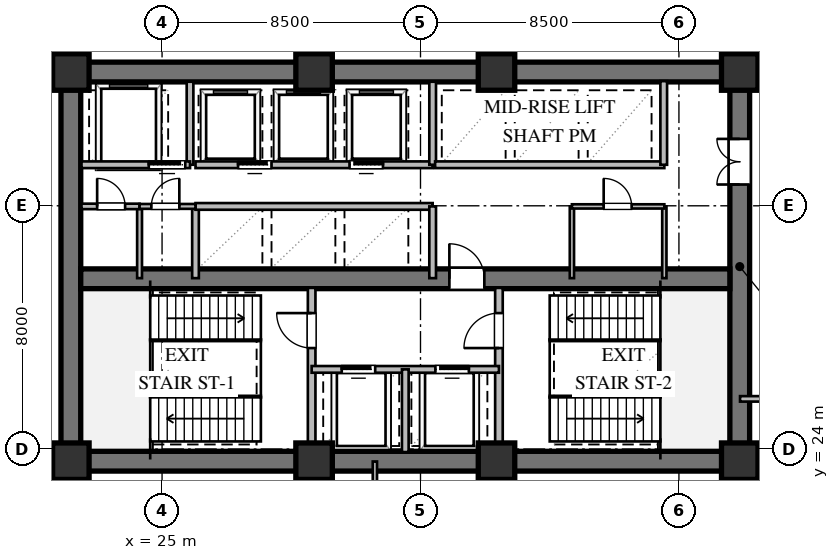
"""IFC4 building model, lengths in metres.
Left out: names, types, materials, properties, quantities, classifications, styles, units other than length and angle.
Written with IfcOpenShell. Run it as: python <this file> out.ifc"""

import sys

from ifc_helpers import new_model, si_unit, direction, frame, frame_2d, origin, origin_2d, place, context, subcontext, project, spatial, rectangle, extrude, element, fill, save


model = new_model("IFC4")
c1 = context("Model", 3, precision=1e-05, world=origin(), true_north=direction((0.0, 1.0)))
c2 = subcontext(c1, "Body", "Model", "MODEL_VIEW")
j1 = project(units=[si_unit("LENGTHUNIT", "METRE"), si_unit("PLANEANGLEUNIT", "RADIAN")], contexts=[c1])
p1 = place(None, origin())
s1 = spatial("IfcSite", under=j1, at=p1, CompositionType="ELEMENT")
p2 = place(p1, origin())
s2 = spatial("IfcBuilding", under=s1, at=p2, CompositionType="ELEMENT")
p3 = place(p2, frame((0.0, 0.0, 14.4)))
s3 = spatial("IfcBuildingStorey", under=s2, at=p3, CompositionType="ELEMENT", Elevation=14.4)
for number, where, z_axis, x_axis in (
    (1, (21.675, 23.6, 0.0), (0.0, 0.0, 1.0), (1.0, 0.0, 0.0)),
    (2, (21.675, 36.4, 0.0), (0.0, 0.0, 1.0), (1.0, 0.0, 0.0)),
):
    element("IfcWall", number, at=place(p3, frame(where, z_axis=z_axis, x_axis=x_axis)), inside=s3, PredefinedType="SHEAR", context=c2, shape_type="SweptSolid", body=[
        extrude(rectangle(XDim=22.65, YDim=0.65, at=frame_2d((11.325, 0.0))), origin(), (0.0, 0.0, 1.0), 4.52),
    ])
p4 = place(p3, frame((22.0, 23.925, 0.0), z_axis=(0.0, 0.0, 1.0), x_axis=(0.0, 1.0, 0.0)))
e3 = element("IfcWall", 3, at=p4, inside=s3, PredefinedType="SHEAR", context=c2, shape_type="SweptSolid", body=[
    extrude(rectangle(XDim=12.15, YDim=0.65, at=frame_2d((6.075, 0.0))), origin(), (0.0, 0.0, 1.0), 4.52),
])
p5 = place(p3, frame((44.0, 23.925, 0.0), z_axis=(0.0, 0.0, 1.0), x_axis=(0.0, 1.0, 0.0)))
e4 = element("IfcWall", 4, at=p5, inside=s3, PredefinedType="SHEAR", context=c2, shape_type="SweptSolid", body=[
    extrude(rectangle(XDim=12.15, YDim=0.65, at=frame_2d((6.075, 0.0))), origin(), (0.0, 0.0, 1.0), 4.52),
])
p6 = place(p5, frame((8.775, 0.0, 0.0)))
e5 = element("IfcOpeningElement", 5, at=p6, cuts=e4, PredefinedType="OPENING", context=c2, shape_type="SweptSolid", body=[
    extrude(rectangle(XDim=1.5, YDim=2.15, at=frame_2d((0.75, 1.075))), frame((0.0, 0.335, 0.0), z_axis=(0.0, -1.0, 0.0), x_axis=(1.0, 0.0, 0.0)), (0.0, 0.0, 1.0), 0.67),
])
p7 = place(p3, frame((22.325, 29.6, 0.0), z_axis=(0.0, 0.0, 1.0), x_axis=(1.0, 0.0, 0.0)))
e6 = element("IfcWall", 6, at=p7, inside=s3, PredefinedType="SHEAR", context=c2, shape_type="SweptSolid", body=[
    extrude(rectangle(XDim=21.35, YDim=0.65, at=frame_2d((10.675, 0.0))), origin(), (0.0, 0.0, 1.0), 4.52),
])
p8 = place(p7, frame((12.125, 0.0, 0.0)))
e7 = element("IfcOpeningElement", 7, at=p8, cuts=e6, PredefinedType="OPENING", context=c2, shape_type="SweptSolid", body=[
    extrude(rectangle(XDim=1.15, YDim=2.1, at=frame_2d((0.575, 1.05))), frame((0.0, 0.335, 0.0), z_axis=(0.0, -1.0, 0.0), x_axis=(1.0, 0.0, 0.0)), (0.0, 0.0, 1.0), 0.67),
])
for number, where, z_axis, x_axis in (
    (8, (22.0, 23.6, 0.0), (0.0, 0.0, 1.0), (1.0, 0.0, 0.0)),
    (9, (30.0, 23.6, 0.0), (0.0, 0.0, 1.0), (1.0, 0.0, 0.0)),
    (10, (36.0, 23.6, 0.0), (0.0, 0.0, 1.0), (1.0, 0.0, 0.0)),
    (11, (44.0, 23.6, 0.0), (0.0, 0.0, 1.0), (1.0, 0.0, 0.0)),
    (12, (44.0, 36.4, 0.0), (0.0, 0.0, 1.0), (1.0, 0.0, 0.0)),
    (13, (36.0, 36.4, 0.0), (0.0, 0.0, 1.0), (1.0, 0.0, 0.0)),
    (14, (30.0, 36.4, 0.0), (0.0, 0.0, 1.0), (1.0, 0.0, 0.0)),
    (15, (22.0, 36.4, 0.0), (0.0, 0.0, 1.0), (1.0, 0.0, 0.0)),
):
    element("IfcColumn", number, at=place(p3, frame(where, z_axis=z_axis, x_axis=x_axis)), inside=s3, PredefinedType="COLUMN", context=c2, shape_type="SweptSolid", body=[
        extrude(rectangle(XDim=1.2, YDim=1.2, at=origin_2d()), origin(), (0.0, 0.0, 1.0), 4.8),
    ])
p9 = place(p3, frame((29.92, 23.9, 0.0), z_axis=(0.0, 0.0, 1.0), x_axis=(0.0, 1.0, 0.0)))
e16 = element("IfcWall", 16, at=p9, inside=s3, PredefinedType="SOLIDWALL", context=c2, shape_type="SweptSolid", body=[
    extrude(rectangle(XDim=5.4, YDim=0.25, at=frame_2d((2.7, 0.0))), origin(), (0.0, 0.0, 1.0), 4.52),
])
p10 = place(p9, frame((3.421, 0.0, 0.0)))
e17 = element("IfcOpeningElement", 17, at=p10, cuts=e16, PredefinedType="OPENING", context=c2, shape_type="SweptSolid", body=[
    extrude(rectangle(XDim=1.15, YDim=2.1, at=frame_2d((0.575, 1.05))), frame((0.0, 0.135, 0.0), z_axis=(0.0, -1.0, 0.0), x_axis=(1.0, 0.0, 0.0)), (0.0, 0.0, 1.0), 0.27),
])
p11 = place(p3, frame((36.08, 23.9, 0.0), z_axis=(0.0, 0.0, 1.0), x_axis=(0.0, 1.0, 0.0)))
e18 = element("IfcWall", 18, at=p11, inside=s3, PredefinedType="SOLIDWALL", context=c2, shape_type="SweptSolid", body=[
    extrude(rectangle(XDim=5.4, YDim=0.25, at=frame_2d((2.7, 0.0))), origin(), (0.0, 0.0, 1.0), 4.52),
])
p12 = place(p11, frame((3.421, 0.0, 0.0)))
e19 = element("IfcOpeningElement", 19, at=p12, cuts=e18, PredefinedType="OPENING", context=c2, shape_type="SweptSolid", body=[
    extrude(rectangle(XDim=1.15, YDim=2.1, at=frame_2d((0.575, 1.05))), frame((0.0, 0.135, 0.0), z_axis=(0.0, -1.0, 0.0), x_axis=(1.0, 0.0, 0.0)), (0.0, 0.0, 1.0), 0.27),
])
p13 = place(p3, frame((29.92, 26.62, 0.0), z_axis=(0.0, 0.0, 1.0), x_axis=(1.0, 0.0, 0.0)))
e20 = element("IfcWall", 20, at=p13, inside=s3, PredefinedType="SOLIDWALL", context=c2, shape_type="SweptSolid", body=[
    extrude(rectangle(XDim=6.16, YDim=0.22, at=frame_2d((3.08, 0.0))), origin(), (0.0, 0.0, 1.0), 4.52),
])
p14 = place(p13, frame((0.99, 0.0, 0.0)))
e21 = element("IfcOpeningElement", 21, at=p14, cuts=e20, PredefinedType="OPENING", context=c2, shape_type="SweptSolid", body=[
    extrude(rectangle(XDim=1.1, YDim=2.1, at=frame_2d((0.55, 1.05))), frame((0.0, 0.12, 0.0), z_axis=(0.0, -1.0, 0.0), x_axis=(1.0, 0.0, 0.0)), (0.0, 0.0, 1.0), 0.24),
])
p15 = place(p13, frame((4.07, 0.0, 0.0)))
e22 = element("IfcOpeningElement", 22, at=p15, cuts=e20, PredefinedType="OPENING", context=c2, shape_type="SweptSolid", body=[
    extrude(rectangle(XDim=1.1, YDim=2.1, at=frame_2d((0.55, 1.05))), frame((0.0, 0.12, 0.0), z_axis=(0.0, -1.0, 0.0), x_axis=(1.0, 0.0, 0.0)), (0.0, 0.0, 1.0), 0.24),
])
p16 = place(p3, frame((33.0, 23.9, 0.0), z_axis=(0.0, 0.0, 1.0), x_axis=(0.0, 1.0, 0.0)))
e23 = element("IfcWall", 23, at=p16, inside=s3, PredefinedType="SOLIDWALL", context=c2, shape_type="SweptSolid", body=[
    extrude(rectangle(XDim=2.72, YDim=0.22, at=frame_2d((1.36, 0.0))), origin(), (0.0, 0.0, 1.0), 4.52),
])
p17 = place(p3, frame((25.92, 33.35, 0.0), z_axis=(0.0, 0.0, 1.0), x_axis=(0.0, 1.0, 0.0)))
e24 = element("IfcWall", 24, at=p17, inside=s3, PredefinedType="SOLIDWALL", context=c2, shape_type="SweptSolid", body=[
    extrude(rectangle(XDim=2.73, YDim=0.22, at=frame_2d((1.365, 0.0))), origin(), (0.0, 0.0, 1.0), 4.52),
])
p18 = place(p3, frame((22.35, 33.35, 0.0), z_axis=(0.0, 0.0, 1.0), x_axis=(1.0, 0.0, 0.0)))
e25 = element("IfcWall", 25, at=p18, inside=s3, PredefinedType="SOLIDWALL", context=c2, shape_type="SweptSolid", body=[
    extrude(rectangle(XDim=3.57, YDim=0.22, at=frame_2d((1.785, 0.0))), origin(), (0.0, 0.0, 1.0), 4.52),
])
p19 = place(p18, frame((2.213, 0.0, 0.0)))
e26 = element("IfcOpeningElement", 26, at=p19, cuts=e25, PredefinedType="OPENING", context=c2, shape_type="SweptSolid", body=[
    extrude(rectangle(XDim=1.2, YDim=2.1, at=frame_2d((0.6, 1.05))), frame((0.0, 0.12, 0.0), z_axis=(0.0, -1.0, 0.0), x_axis=(1.0, 0.0, 0.0)), (0.0, 0.0, 1.0), 0.24),
])
p20 = place(p3, frame((26.1, 29.62, 0.0), z_axis=(0.0, 0.0, 1.0), x_axis=(0.0, 1.0, 0.0)))
e27 = element("IfcWall", 27, at=p20, inside=s3, PredefinedType="SOLIDWALL", context=c2, shape_type="SweptSolid", body=[
    extrude(rectangle(XDim=2.36, YDim=0.22, at=frame_2d((1.18, 0.0))), origin(), (0.0, 0.0, 1.0), 4.52),
])
p21 = place(p3, frame((26.1, 31.98, 0.0), z_axis=(0.0, 0.0, 1.0), x_axis=(1.0, 0.0, 0.0)))
e28 = element("IfcWall", 28, at=p21, inside=s3, PredefinedType="SOLIDWALL", context=c2, shape_type="SweptSolid", body=[
    extrude(rectangle(XDim=7.8, YDim=0.22, at=frame_2d((3.9, 0.0))), origin(), (0.0, 0.0, 1.0), 4.52),
])
p22 = place(p3, frame((33.9, 29.62, 0.0), z_axis=(0.0, 0.0, 1.0), x_axis=(0.0, 1.0, 0.0)))
e29 = element("IfcWall", 29, at=p22, inside=s3, PredefinedType="SOLIDWALL", context=c2, shape_type="SweptSolid", body=[
    extrude(rectangle(XDim=2.36, YDim=0.22, at=frame_2d((1.18, 0.0))), origin(), (0.0, 0.0, 1.0), 4.52),
])
p23 = place(p3, frame((26.1, 33.35, 0.0), z_axis=(0.0, 0.0, 1.0), x_axis=(1.0, 0.0, 0.0)))
e30 = element("IfcWall", 30, at=p23, inside=s3, PredefinedType="SOLIDWALL", context=c2, shape_type="SweptSolid", body=[
    extrude(rectangle(XDim=7.8, YDim=0.22, at=frame_2d((3.9, 0.0))), origin(), (0.0, 0.0, 1.0), 4.52),
])
p24 = place(p23, frame((1.4, 0.0, 0.0)))
e31 = element("IfcOpeningElement", 31, at=p24, cuts=e30, PredefinedType="OPENING", context=c2, shape_type="SweptSolid", body=[
    extrude(rectangle(XDim=1.1, YDim=2.1, at=frame_2d((0.55, 1.05))), frame((0.0, 0.12, 0.0), z_axis=(0.0, -1.0, 0.0), x_axis=(1.0, 0.0, 0.0)), (0.0, 0.0, 1.0), 0.24),
])
p25 = place(p23, frame((5.066, 0.0, 0.0)))
e32 = element("IfcOpeningElement", 32, at=p25, cuts=e30, PredefinedType="OPENING", context=c2, shape_type="SweptSolid", body=[
    extrude(rectangle(XDim=1.1, YDim=2.1, at=frame_2d((0.55, 1.05))), frame((0.0, 0.12, 0.0), z_axis=(0.0, -1.0, 0.0), x_axis=(1.0, 0.0, 0.0)), (0.0, 0.0, 1.0), 0.24),
])
p26 = place(p3, frame((33.9, 33.35, 0.0), z_axis=(0.0, 0.0, 1.0), x_axis=(0.0, 1.0, 0.0)))
e33 = element("IfcWall", 33, at=p26, inside=s3, PredefinedType="SOLIDWALL", context=c2, shape_type="SweptSolid", body=[
    extrude(rectangle(XDim=2.73, YDim=0.22, at=frame_2d((1.365, 0.0))), origin(), (0.0, 0.0, 1.0), 4.52),
])
p27 = place(p3, frame((33.98, 33.35, 0.0), z_axis=(0.0, 0.0, 1.0), x_axis=(1.0, 0.0, 0.0)))
e34 = element("IfcWall", 34, at=p27, inside=s3, PredefinedType="SOLIDWALL", context=c2, shape_type="SweptSolid", body=[
    extrude(rectangle(XDim=7.54, YDim=0.22, at=frame_2d((3.77, 0.0))), origin(), (0.0, 0.0, 1.0), 4.52),
])
p28 = place(p3, frame((41.5, 33.35, 0.0), z_axis=(0.0, 0.0, 1.0), x_axis=(0.0, 1.0, 0.0)))
e35 = element("IfcWall", 35, at=p28, inside=s3, PredefinedType="SOLIDWALL", context=c2, shape_type="SweptSolid", body=[
    extrude(rectangle(XDim=2.75, YDim=0.22, at=frame_2d((1.375, 0.0))), origin(), (0.0, 0.0, 1.0), 4.52),
])
p29 = place(p3, frame((24.26, 29.62, 0.0), z_axis=(0.0, 0.0, 1.0), x_axis=(0.0, 1.0, 0.0)))
e36 = element("IfcWall", 36, at=p29, inside=s3, PredefinedType="PLUMBINGWALL", context=c2, shape_type="SweptSolid", body=[
    extrude(rectangle(XDim=2.36, YDim=0.16, at=frame_2d((1.18, 0.0))), origin(), (0.0, 0.0, 1.0), 1.887),
])
p30 = place(p3, frame((22.35, 31.98, 0.0), z_axis=(0.0, 0.0, 1.0), x_axis=(1.0, 0.0, 0.0)))
e37 = element("IfcWall", 37, at=p30, inside=s3, PredefinedType="PARTITIONING", context=c2, shape_type="SweptSolid", body=[
    extrude(rectangle(XDim=1.91, YDim=0.18, at=frame_2d((0.955, 0.0))), origin(), (0.0, 0.0, 1.0), 4.52),
])
p31 = place(p30, frame((0.515, 0.0, 0.0)))
e38 = element("IfcOpeningElement", 38, at=p31, cuts=e37, PredefinedType="OPENING", context=c2, shape_type="SweptSolid", body=[
    extrude(rectangle(XDim=0.92, YDim=2.1, at=frame_2d((0.46, 1.05))), frame((0.0, 0.1, 0.0), z_axis=(0.0, -1.0, 0.0), x_axis=(1.0, 0.0, 0.0)), (0.0, 0.0, 1.0), 0.2),
])
p32 = place(p3, frame((24.26, 31.98, 0.0), z_axis=(0.0, 0.0, 1.0), x_axis=(1.0, 0.0, 0.0)))
e39 = element("IfcWall", 39, at=p32, inside=s3, PredefinedType="PLUMBINGWALL", context=c2, shape_type="SweptSolid", body=[
    extrude(rectangle(XDim=1.84, YDim=0.16, at=frame_2d((0.92, 0.0))), origin(), (0.0, 0.0, 1.0), 4.52),
])
p33 = place(p32, frame((0.388, 0.0, 0.0)))
e40 = element("IfcOpeningElement", 40, at=p33, cuts=e39, PredefinedType="OPENING", context=c2, shape_type="SweptSolid", body=[
    extrude(rectangle(XDim=0.92, YDim=2.1, at=frame_2d((0.46, 1.05))), frame((0.0, 0.09, 0.0), z_axis=(0.0, -1.0, 0.0), x_axis=(1.0, 0.0, 0.0)), (0.0, 0.0, 1.0), 0.18),
])
p34 = place(p3, frame((38.48, 29.62, 0.0), z_axis=(0.0, 0.0, 1.0), x_axis=(0.0, 1.0, 0.0)))
e41 = element("IfcWall", 41, at=p34, inside=s3, PredefinedType="PARTITIONING", context=c2, shape_type="SweptSolid", body=[
    extrude(rectangle(XDim=2.36, YDim=0.14, at=frame_2d((1.18, 0.0))), origin(), (0.0, 0.0, 1.0), 4.52),
])
p35 = place(p3, frame((41.52, 29.62, 0.0), z_axis=(0.0, 0.0, 1.0), x_axis=(0.0, 1.0, 0.0)))
e42 = element("IfcWall", 42, at=p35, inside=s3, PredefinedType="PARTITIONING", context=c2, shape_type="SweptSolid", body=[
    extrude(rectangle(XDim=2.36, YDim=0.14, at=frame_2d((1.18, 0.0))), origin(), (0.0, 0.0, 1.0), 1.887),
])
p36 = place(p3, frame((38.48, 31.98, 0.0), z_axis=(0.0, 0.0, 1.0), x_axis=(1.0, 0.0, 0.0)))
e43 = element("IfcWall", 43, at=p36, inside=s3, PredefinedType="PARTITIONING", context=c2, shape_type="SweptSolid", body=[
    extrude(rectangle(XDim=3.04, YDim=0.14, at=frame_2d((1.52, 0.0))), origin(), (0.0, 0.0, 1.0), 4.52),
])
p37 = place(p36, frame((1.045, 0.0, 0.0)))
e44 = element("IfcOpeningElement", 44, at=p37, cuts=e43, PredefinedType="OPENING", context=c2, shape_type="SweptSolid", body=[
    extrude(rectangle(XDim=0.92, YDim=2.1, at=frame_2d((0.46, 1.05))), frame((0.0, 0.08, 0.0), z_axis=(0.0, -1.0, 0.0), x_axis=(1.0, 0.0, 0.0)), (0.0, 0.0, 1.0), 0.16),
])
p38 = place(p3, frame((62.415, 25.65, 0.0), z_axis=(0.0, 0.0, 1.0), x_axis=(-1.0, 0.0, 0.0)))
e45 = element("IfcWall", 45, at=p38, inside=s3, PredefinedType="PARTITIONING", context=c2, shape_type="SweptSolid", body=[
    extrude(rectangle(XDim=18.405, YDim=0.18, at=frame_2d((9.203, 0.0))), origin(), (0.0, 0.0, 1.0), 4.05),
])
p39 = place(p38, frame((8.46, 0.0, 0.0)))
e46 = element("IfcOpeningElement", 46, at=p39, cuts=e45, PredefinedType="OPENING", context=c2, shape_type="SweptSolid", body=[
    extrude(rectangle(XDim=1.2, YDim=2.15, at=frame_2d((0.6, 1.075))), frame((0.0, 0.1, 0.0), z_axis=(0.0, -1.0, 0.0), x_axis=(1.0, 0.0, 0.0)), (0.0, 0.0, 1.0), 0.2),
])
p40 = place(p3, frame((21.675, 23.59, 0.0), z_axis=(0.0, 0.0, 1.0), x_axis=(0.0, -1.0, 0.0)))
e47 = element("IfcWall", 47, at=p40, inside=s3, PredefinedType="PARTITIONING", context=c2, shape_type="SweptSolid", body=[
    extrude(rectangle(XDim=3.62, YDim=0.18, at=frame_2d((1.81, 0.0))), origin(), (0.0, 0.0, 1.0), 3.66),
])
p41 = place(p3, frame((44.325, 5.272, 0.0), z_axis=(0.0, 0.0, 1.0), x_axis=(0.0, 1.0, 0.0)))
e48 = element("IfcWall", 48, at=p41, inside=s3, PredefinedType="PARTITIONING", context=c2, shape_type="SweptSolid", body=[
    extrude(rectangle(XDim=18.318, YDim=0.14, at=frame_2d((9.159, 0.0))), origin(), (0.0, 0.0, 1.0), 3.66),
])
p42 = place(p41, frame((8.349, 0.0, 0.0)))
e49 = element("IfcOpeningElement", 49, at=p42, cuts=e48, PredefinedType="OPENING", context=c2, shape_type="SweptSolid", body=[
    extrude(rectangle(XDim=1.2, YDim=2.15, at=frame_2d((0.6, 1.075))), frame((0.0, 0.08, 0.0), z_axis=(0.0, -1.0, 0.0), x_axis=(1.0, 0.0, 0.0)), (0.0, 0.0, 1.0), 0.16),
])
p43 = place(p3, frame((32.0, 23.59, 0.0), z_axis=(0.0, 0.0, 1.0), x_axis=(0.0, -1.0, 0.0)))
e50 = element("IfcWall", 50, at=p43, inside=s3, PredefinedType="PARTITIONING", context=c2, shape_type="SweptSolid", body=[
    extrude(rectangle(XDim=16.944, YDim=0.14, at=frame_2d((8.472, 0.0))), origin(), (0.0, 0.0, 1.0), 4.52),
])
p44 = place(p10, origin())
e51 = element("IfcDoor", 51, at=p44, inside=s3, OperationType="SINGLE_SWING_RIGHT", PredefinedType="DOOR", context=c2, shape_type="SweptSolid", body=[
    extrude(rectangle(XDim=1.15, YDim=2.1, at=frame_2d((0.575, 1.05))), frame((0.0, 0.025, 0.0), z_axis=(0.0, -1.0, 0.0), x_axis=(1.0, 0.0, 0.0)), (0.0, 0.0, 1.0), 0.05),
])
fill(e17, e51)
p45 = place(p12, origin())
e52 = element("IfcDoor", 52, at=p45, inside=s3, OperationType="SINGLE_SWING_LEFT", PredefinedType="DOOR", context=c2, shape_type="SweptSolid", body=[
    extrude(rectangle(XDim=1.15, YDim=2.1, at=frame_2d((0.575, 1.05))), frame((0.0, 0.025, 0.0), z_axis=(0.0, -1.0, 0.0), x_axis=(1.0, 0.0, 0.0)), (0.0, 0.0, 1.0), 0.05),
])
fill(e19, e52)
p46 = place(p14, origin())
e53 = element("IfcDoor", 53, at=p46, inside=s3, OperationType="SLIDING_TO_LEFT", PredefinedType="DOOR", context=c2, shape_type="SweptSolid", body=[
    extrude(rectangle(XDim=1.1, YDim=2.1, at=frame_2d((0.55, 1.05))), frame((0.0, 0.025, 0.0), z_axis=(0.0, -1.0, 0.0), x_axis=(1.0, 0.0, 0.0)), (0.0, 0.0, 1.0), 0.05),
])
fill(e21, e53)
p47 = place(p15, origin())
e54 = element("IfcDoor", 54, at=p47, inside=s3, OperationType="SLIDING_TO_RIGHT", PredefinedType="DOOR", context=c2, shape_type="SweptSolid", body=[
    extrude(rectangle(XDim=1.1, YDim=2.1, at=frame_2d((0.55, 1.05))), frame((0.0, 0.025, 0.0), z_axis=(0.0, -1.0, 0.0), x_axis=(1.0, 0.0, 0.0)), (0.0, 0.0, 1.0), 0.05),
])
fill(e22, e54)
p48 = place(p8, origin())
e55 = element("IfcDoor", 55, at=p48, inside=s3, OperationType="SINGLE_SWING_LEFT", PredefinedType="DOOR", context=c2, shape_type="SweptSolid", body=[
    extrude(rectangle(XDim=1.15, YDim=2.1, at=frame_2d((0.575, 1.05))), frame((0.0, 0.025, 0.0), z_axis=(0.0, -1.0, 0.0), x_axis=(1.0, 0.0, 0.0)), (0.0, 0.0, 1.0), 0.05),
])
fill(e7, e55)
p49 = place(p6, origin())
e56 = element("IfcDoor", 56, at=p49, inside=s3, OperationType="DOUBLE_DOOR_SINGLE_SWING", PredefinedType="DOOR", context=c2, shape_type="SweptSolid", body=[
    extrude(rectangle(XDim=1.5, YDim=2.15, at=frame_2d((0.75, 1.075))), frame((0.0, 0.025, 0.0), z_axis=(0.0, -1.0, 0.0), x_axis=(1.0, 0.0, 0.0)), (0.0, 0.0, 1.0), 0.05),
])
fill(e5, e56)
p50 = place(p19, origin())
e57 = element("IfcDoor", 57, at=p50, inside=s3, OperationType="SLIDING_TO_LEFT", PredefinedType="DOOR", context=c2, shape_type="SweptSolid", body=[
    extrude(rectangle(XDim=1.2, YDim=2.1, at=frame_2d((0.6, 1.05))), frame((0.0, 0.025, 0.0), z_axis=(0.0, -1.0, 0.0), x_axis=(1.0, 0.0, 0.0)), (0.0, 0.0, 1.0), 0.05),
])
fill(e26, e57)
p51 = place(p24, origin())
e58 = element("IfcDoor", 58, at=p51, inside=s3, OperationType="SLIDING_TO_LEFT", PredefinedType="DOOR", context=c2, shape_type="SweptSolid", body=[
    extrude(rectangle(XDim=1.1, YDim=2.1, at=frame_2d((0.55, 1.05))), frame((0.0, 0.025, 0.0), z_axis=(0.0, -1.0, 0.0), x_axis=(1.0, 0.0, 0.0)), (0.0, 0.0, 1.0), 0.05),
])
fill(e31, e58)
p52 = place(p25, origin())
e59 = element("IfcDoor", 59, at=p52, inside=s3, OperationType="SLIDING_TO_RIGHT", PredefinedType="DOOR", context=c2, shape_type="SweptSolid", body=[
    extrude(rectangle(XDim=1.1, YDim=2.1, at=frame_2d((0.55, 1.05))), frame((0.0, 0.025, 0.0), z_axis=(0.0, -1.0, 0.0), x_axis=(1.0, 0.0, 0.0)), (0.0, 0.0, 1.0), 0.05),
])
fill(e32, e59)
p53 = place(p31, origin())
e60 = element("IfcDoor", 60, at=p53, inside=s3, OperationType="SINGLE_SWING_LEFT", PredefinedType="DOOR", context=c2, shape_type="SweptSolid", body=[
    extrude(rectangle(XDim=0.92, YDim=2.1, at=frame_2d((0.46, 1.05))), frame((0.0, 0.025, 0.0), z_axis=(0.0, -1.0, 0.0), x_axis=(1.0, 0.0, 0.0)), (0.0, 0.0, 1.0), 0.05),
])
fill(e38, e60)
p54 = place(p33, origin())
e61 = element("IfcDoor", 61, at=p54, inside=s3, OperationType="SINGLE_SWING_RIGHT", PredefinedType="DOOR", context=c2, shape_type="SweptSolid", body=[
    extrude(rectangle(XDim=0.92, YDim=2.1, at=frame_2d((0.46, 1.05))), frame((0.0, 0.025, 0.0), z_axis=(0.0, -1.0, 0.0), x_axis=(1.0, 0.0, 0.0)), (0.0, 0.0, 1.0), 0.05),
])
fill(e40, e61)
p55 = place(p37, origin())
e62 = element("IfcDoor", 62, at=p55, inside=s3, OperationType="SINGLE_SWING_LEFT", PredefinedType="DOOR", context=c2, shape_type="SweptSolid", body=[
    extrude(rectangle(XDim=0.92, YDim=2.1, at=frame_2d((0.46, 1.05))), frame((0.0, 0.025, 0.0), z_axis=(0.0, -1.0, 0.0), x_axis=(1.0, 0.0, 0.0)), (0.0, 0.0, 1.0), 0.05),
])
fill(e44, e62)
save(model, sys.argv[1])
